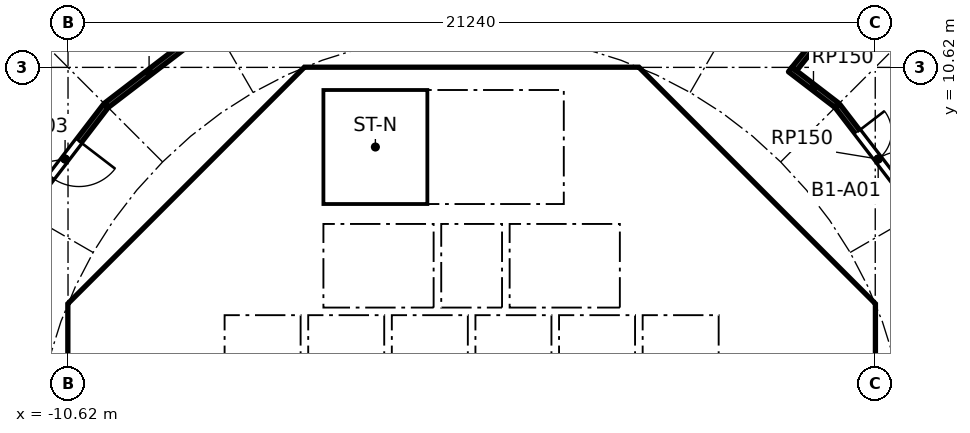
"""IFC4 building model, lengths in metres.
Left out: names, types, materials, properties, quantities, classifications, styles, units other than length and angle.
Written with IfcOpenShell. Run it as: python <this file> out.ifc"""

import sys

from ifc_helpers import new_model, si_unit, direction, frame, frame_2d, origin, place, context, subcontext, project, spatial, polyline, rectangle, outline, extrude, element, fill, save


model = new_model("IFC4")
c1 = context("Model", 3, precision=1e-05, world=origin(), true_north=direction((0.0, 1.0)))
c2 = subcontext(c1, "Body", "Model", "MODEL_VIEW")
j1 = project(units=[si_unit("LENGTHUNIT", "METRE"), si_unit("PLANEANGLEUNIT", "RADIAN")], contexts=[c1])
p1 = place(None, origin())
s1 = spatial("IfcSite", under=j1, at=p1, CompositionType="ELEMENT")
p2 = place(p1, origin())
s2 = spatial("IfcBuilding", under=s1, at=p2, CompositionType="ELEMENT")
p3 = place(p2, frame((0.0, 0.0, -5.0)))
s3 = spatial("IfcBuildingStorey", under=s2, at=p3, CompositionType="ELEMENT", Elevation=-5.0)
p4 = place(p3, frame((9.988, 4.613, 0.0), z_axis=(0.0, 0.0, 1.0), x_axis=(-0.707106781187, 0.707106781187, 0.0)))
e1 = element("IfcWall", 1, at=p4, inside=s3, PredefinedType="SHEAR", context=c2, shape_type="SweptSolid", body=[
    extrude(rectangle(XDim=7.602, YDim=0.6, at=frame_2d((3.801, 0.0))), origin(), (0.0, 0.0, 1.0), 4.6),
])
p5 = place(p4, frame((3.201, 0.0, 0.0)))
e2 = element("IfcOpeningElement", 2, at=p5, cuts=e1, PredefinedType="OPENING", context=c2, shape_type="SweptSolid", body=[
    extrude(rectangle(XDim=1.2, YDim=2.1, at=frame_2d((0.6, 1.05))), frame((0.0, 0.31, 0.0), z_axis=(0.0, -1.0, 0.0), x_axis=(1.0, 0.0, 0.0)), (0.0, 0.0, 1.0), 0.62),
])
p6 = place(p3, frame((-4.613, 9.988, 0.0), z_axis=(0.0, 0.0, 1.0), x_axis=(-0.707106781187, -0.707106781187, 0.0)))
e3 = element("IfcWall", 3, at=p6, inside=s3, PredefinedType="SHEAR", context=c2, shape_type="SweptSolid", body=[
    extrude(rectangle(XDim=7.602, YDim=0.6, at=frame_2d((3.801, 0.0))), origin(), (0.0, 0.0, 1.0), 4.6),
])
p7 = place(p6, frame((0.351, 0.0, 0.0)))
e4 = element("IfcOpeningElement", 4, at=p7, cuts=e3, PredefinedType="OPENING", context=c2, shape_type="SweptSolid", body=[
    extrude(rectangle(XDim=1.1, YDim=2.1, at=frame_2d((0.55, 1.05))), frame((0.0, 0.31, 0.0), z_axis=(0.0, -1.0, 0.0), x_axis=(1.0, 0.0, 0.0)), (0.0, 0.0, 1.0), 0.62),
])
p8 = place(p3, frame((-10.325, 3.801, 0.0), z_axis=(0.0, 0.0, 1.0), x_axis=(0.0, -1.0, 0.0)))
e5 = element("IfcWall", 5, at=p8, inside=s3, PredefinedType="SHEAR", context=c2, shape_type="SweptSolid", body=[
    extrude(rectangle(XDim=7.602, YDim=0.6, at=frame_2d((3.801, 0.0))), origin(), (0.0, 0.0, 1.0), 4.6),
])
p9 = place(p8, frame((0.651, 0.0, 0.0)))
e6 = element("IfcOpeningElement", 6, at=p9, cuts=e5, PredefinedType="OPENING", context=c2, shape_type="SweptSolid", body=[
    extrude(rectangle(XDim=1.5, YDim=2.1, at=frame_2d((0.75, 1.05))), frame((0.0, 0.31, 0.0), z_axis=(0.0, -1.0, 0.0), x_axis=(1.0, 0.0, 0.0)), (0.0, 0.0, 1.0), 0.62),
])
p10 = place(p8, frame((5.451, 0.0, 0.0)))
e7 = element("IfcOpeningElement", 7, at=p10, cuts=e5, PredefinedType="OPENING", context=c2, shape_type="SweptSolid", body=[
    extrude(rectangle(XDim=1.5, YDim=2.1, at=frame_2d((0.75, 1.05))), frame((0.0, 0.31, 0.0), z_axis=(0.0, -1.0, 0.0), x_axis=(1.0, 0.0, 0.0)), (0.0, 0.0, 1.0), 0.62),
])
p11 = place(p3, frame((-5.8, 4.3, 0.0), z_axis=(0.0, 0.0, 1.0), x_axis=(0.0, 1.0, 0.0)))
e8 = element("IfcWall", 8, at=p11, inside=s3, PredefinedType="PARTITIONING", context=c2, shape_type="SweptSolid", body=[
    extrude(rectangle(XDim=3.927, YDim=0.15, at=frame_2d((1.963, 0.0))), origin(), (0.0, 0.0, 1.0), 4.6),
])
p12 = place(p11, frame((1.551, 0.0, 0.0)))
e9 = element("IfcOpeningElement", 9, at=p12, cuts=e8, PredefinedType="OPENING", context=c2, shape_type="SweptSolid", body=[
    extrude(rectangle(XDim=0.9, YDim=2.1, at=frame_2d((0.45, 1.05))), frame((0.0, 0.085, 0.0), z_axis=(0.0, -1.0, 0.0), x_axis=(1.0, 0.0, 0.0)), (0.0, 0.0, 1.0), 0.17),
])
p13 = place(p3, frame((4.0, 4.3, 0.0), z_axis=(0.0, 0.0, 1.0), x_axis=(0.0, 1.0, 0.0)))
e10 = element("IfcWall", 10, at=p13, inside=s3, PredefinedType="SOLIDWALL", context=c2, shape_type="SweptSolid", body=[
    extrude(rectangle(XDim=2.2, YDim=0.2, at=frame_2d((1.1, 0.0))), origin(), (0.0, 0.0, 1.0), 4.6),
])
p14 = place(p13, frame((0.55, 0.0, 0.0)))
e11 = element("IfcOpeningElement", 11, at=p14, cuts=e10, PredefinedType="OPENING", context=c2, shape_type="SweptSolid", body=[
    extrude(rectangle(XDim=1.1, YDim=2.1, at=frame_2d((0.55, 1.05))), frame((0.0, 0.11, 0.0), z_axis=(0.0, -1.0, 0.0), x_axis=(1.0, 0.0, 0.0)), (0.0, 0.0, 1.0), 0.22),
])
p15 = place(p3, frame((-4.0, 4.3, 0.0), z_axis=(0.0, 0.0, 1.0), x_axis=(0.0, 1.0, 0.0)))
e12 = element("IfcWall", 12, at=p15, inside=s3, PredefinedType="SOLIDWALL", context=c2, shape_type="SweptSolid", body=[
    extrude(rectangle(XDim=2.2, YDim=0.2, at=frame_2d((1.1, 0.0))), origin(), (0.0, 0.0, 1.0), 4.6),
])
p16 = place(p15, frame((0.55, 0.0, 0.0)))
e13 = element("IfcOpeningElement", 13, at=p16, cuts=e12, PredefinedType="OPENING", context=c2, shape_type="SweptSolid", body=[
    extrude(rectangle(XDim=1.1, YDim=2.1, at=frame_2d((0.55, 1.05))), frame((0.0, 0.11, 0.0), z_axis=(0.0, -1.0, 0.0), x_axis=(1.0, 0.0, 0.0)), (0.0, 0.0, 1.0), 0.22),
])
p17 = place(p3, frame((6.7, 4.0, 0.0), z_axis=(0.0, 0.0, 1.0), x_axis=(1.0, 0.0, 0.0)))
e14 = element("IfcWall", 14, at=p17, inside=s3, PredefinedType="SOLIDWALL", context=c2, shape_type="SweptSolid", body=[
    extrude(rectangle(XDim=3.325, YDim=0.2, at=frame_2d((1.662, 0.0))), origin(), (0.0, 0.0, 1.0), 4.6),
])
p18 = place(p17, frame((1.25, 0.0, 0.0)))
e15 = element("IfcOpeningElement", 15, at=p18, cuts=e14, PredefinedType="OPENING", context=c2, shape_type="SweptSolid", body=[
    extrude(rectangle(XDim=1.1, YDim=2.1, at=frame_2d((0.55, 1.05))), frame((0.0, 0.11, 0.0), z_axis=(0.0, -1.0, 0.0), x_axis=(1.0, 0.0, 0.0)), (0.0, 0.0, 1.0), 0.22),
])
p19 = place(p3, frame((4.0, 7.025, 0.0), z_axis=(0.0, 0.0, 1.0), x_axis=(0.0, 1.0, 0.0)))
e16 = element("IfcWall", 16, at=p19, inside=s3, PredefinedType="SOLIDWALL", context=c2, shape_type="SweptSolid", body=[
    extrude(rectangle(XDim=3.0, YDim=0.2, at=frame_2d((1.5, 0.0))), origin(), (0.0, 0.0, 1.0), 4.6),
])
p20 = place(p19, frame((0.925, 0.0, 0.0)))
e17 = element("IfcOpeningElement", 17, at=p20, cuts=e16, PredefinedType="OPENING", context=c2, shape_type="SweptSolid", body=[
    extrude(rectangle(XDim=1.1, YDim=2.1, at=frame_2d((0.55, 1.05))), frame((0.0, 0.11, 0.0), z_axis=(0.0, -1.0, 0.0), x_axis=(1.0, 0.0, 0.0)), (0.0, 0.0, 1.0), 0.22),
])
p21 = place(p3, origin())
e18 = element("IfcWall", 18, at=p21, inside=s3, PredefinedType="SHEAR", context=c2, shape_type="SweptSolid", body=[
    extrude(outline(polyline([(-10.2, 4.825), (-9.776, 4.401), (-10.025, 4.152), (-10.025, 3.801), (-10.625, 3.801), (-10.625, 4.401), (-10.2, 4.825)])), origin(), (0.0, 0.0, 1.0), 4.6),
])
p22 = place(p3, origin())
e19 = element("IfcWall", 19, at=p22, inside=s3, PredefinedType="SHEAR", context=c2, shape_type="SweptSolid", body=[
    extrude(outline(polyline([(-4.152, 10.025), (-4.401, 9.776), (-4.825, 10.2), (-4.401, 10.625), (4.401, 10.625), (4.825, 10.2), (4.401, 9.776), (4.152, 10.025), (-4.152, 10.025)])), origin(), (0.0, 0.0, 1.0), 4.6),
])
p23 = place(p3, origin())
e20 = element("IfcWall", 20, at=p23, inside=s3, PredefinedType="SHEAR", context=c2, shape_type="SweptSolid", body=[
    extrude(outline(polyline([(9.776, -4.401), (10.025, -4.152), (10.025, -3.801), (10.025, 4.152), (9.776, 4.401), (10.2, 4.825), (10.625, 4.401), (10.625, -4.401), (10.2, -4.825), (9.776, -4.401)])), origin(), (0.0, 0.0, 1.0), 4.6),
])
for number, where, z_axis, x_axis in (
    (21, (-0.9, 4.3, 0.0), (0.0, 0.0, 1.0), (0.0, 1.0, 0.0)),
    (22, (0.9, 4.3, 0.0), (0.0, 0.0, 1.0), (0.0, 1.0, 0.0)),
):
    element("IfcWall", number, at=place(p3, frame(where, z_axis=z_axis, x_axis=x_axis)), inside=s3, PredefinedType="SOLIDWALL", context=c2, shape_type="SweptSolid", body=[
        extrude(rectangle(XDim=2.2, YDim=0.2, at=frame_2d((1.1, 0.0))), origin(), (0.0, 0.0, 1.0), 4.6),
    ])
p24 = place(p3, origin())
e23 = element("IfcWall", 23, at=p24, inside=s3, PredefinedType="SOLIDWALL", context=c2, shape_type="SweptSolid", body=[
    extrude(outline(polyline([(-6.5, 2.1), (-6.7, 2.1), (-6.7, 4.3), (6.7, 4.3), (6.7, 2.1), (6.5, 2.1), (6.5, 4.1), (4.5, 4.1), (4.5, 2.1), (4.3, 2.1), (4.3, 4.1), (2.3, 4.1), (2.3, 2.1), (2.1, 2.1), (2.1, 4.1), (0.1, 4.1), (0.1, 2.1), (-0.1, 2.1), (-0.1, 4.1), (-2.1, 4.1), (-2.1, 2.1), (-2.3, 2.1), (-2.3, 4.1), (-4.3, 4.1), (-4.3, 2.1), (-4.5, 2.1), (-4.5, 4.1), (-6.5, 4.1), (-6.5, 2.1)])), origin(), (0.0, 0.0, 1.0), 4.6),
])
p25 = place(p3, frame((-10.025, 4.0, 0.0), z_axis=(0.0, 0.0, 1.0), x_axis=(1.0, 0.0, 0.0)))
e24 = element("IfcWall", 24, at=p25, inside=s3, PredefinedType="PARTITIONING", context=c2, shape_type="SweptSolid", body=[
    extrude(rectangle(XDim=3.325, YDim=0.2, at=frame_2d((1.662, 0.0))), origin(), (0.0, 0.0, 1.0), 4.6),
])
p26 = place(p3, origin())
e25 = element("IfcWall", 25, at=p26, inside=s3, PredefinedType="SOLIDWALL", context=c2, shape_type="SweptSolid", body=[
    extrude(outline(polyline([(-3.9, 7.025), (-4.1, 7.025), (-4.1, 10.025), (-3.9, 10.025), (-3.9, 7.025)])), origin(), (0.0, 0.0, 1.0), 4.6),
])
p27 = place(p3, origin())
e26 = element("IfcWall", 26, at=p27, inside=s3, PredefinedType="SOLIDWALL", context=c2, shape_type="SweptSolid", body=[
    extrude(outline(polyline([(4.1, 6.5), (-4.1, 6.5), (-4.1, 7.025), (4.1, 7.025), (4.1, 6.5)])), origin(), (0.0, 0.0, 1.0), 4.6),
])
p28 = place(p3, origin())
e27 = element("IfcWall", 27, at=p28, inside=s3, PredefinedType="SOLIDWALL", context=c2, shape_type="SweptSolid", body=[
    extrude(outline(polyline([(7.025, -3.9), (6.7, -3.9), (6.7, 3.9), (7.025, 3.9), (7.025, -3.9)])), origin(), (0.0, 0.0, 1.0), 4.6),
])
p29 = place(p3, frame((-11.771, 6.809, 0.0), z_axis=(0.0, 0.0, 1.0), x_axis=(0.608736710054, 0.793372307201, 0.0)))
e28 = element("IfcWall", 28, at=p29, inside=s3, PredefinedType="PARTITIONING", context=c2, shape_type="SweptSolid", body=[
    extrude(rectangle(XDim=3.527, YDim=0.15, at=frame_2d((1.763, 0.0))), origin(), (0.0, 0.0, 1.0), 4.6),
])
p30 = place(p29, frame((1.163, 0.0, 0.0)))
e29 = element("IfcOpeningElement", 29, at=p30, cuts=e28, PredefinedType="OPENING", context=c2, shape_type="SweptSolid", body=[
    extrude(rectangle(XDim=1.2, YDim=2.1, at=frame_2d((0.6, 1.05))), frame((0.0, 0.085, 0.0), z_axis=(0.0, -1.0, 0.0), x_axis=(1.0, 0.0, 0.0)), (0.0, 0.0, 1.0), 0.17),
])
p31 = place(p3, frame((-9.607, 9.624, 0.0), z_axis=(0.0, 0.0, 1.0), x_axis=(0.793375345407, 0.608732750311, 0.0)))
e30 = element("IfcWall", 30, at=p31, inside=s3, PredefinedType="PARTITIONING", context=c2, shape_type="SweptSolid", body=[
    extrude(rectangle(XDim=2.824, YDim=0.15, at=frame_2d((1.412, 0.0))), origin(), (0.0, 0.0, 1.0), 4.6),
])
p32 = place(p3, frame((8.382, 10.564, 0.0), z_axis=(0.0, 0.0, 1.0), x_axis=(0.793405235736, -0.608693791578, 0.0)))
e31 = element("IfcWall", 31, at=p32, inside=s3, PredefinedType="PARTITIONING", context=c2, shape_type="SweptSolid", body=[
    extrude(rectangle(XDim=1.544, YDim=0.15, at=frame_2d((0.772, 0.0))), origin(), (0.0, 0.0, 1.0), 4.6),
])
p33 = place(p3, frame((9.624, 9.607, 0.0), z_axis=(0.0, 0.0, 1.0), x_axis=(0.608736710054, -0.793372307201, 0.0)))
e32 = element("IfcWall", 32, at=p33, inside=s3, PredefinedType="PARTITIONING", context=c2, shape_type="SweptSolid", body=[
    extrude(rectangle(XDim=3.527, YDim=0.15, at=frame_2d((1.763, 0.0))), origin(), (0.0, 0.0, 1.0), 4.6),
])
p34 = place(p33, frame((0.863, 0.0, 0.0)))
e33 = element("IfcOpeningElement", 33, at=p34, cuts=e32, PredefinedType="OPENING", context=c2, shape_type="SweptSolid", body=[
    extrude(rectangle(XDim=1.8, YDim=2.1, at=frame_2d((0.9, 1.05))), frame((0.0, 0.085, 0.0), z_axis=(0.0, -1.0, 0.0), x_axis=(1.0, 0.0, 0.0)), (0.0, 0.0, 1.0), 0.17),
])
p35 = place(p3, frame((12.245, 15.257, 0.0), z_axis=(0.0, 0.0, 1.0), x_axis=(-0.625939450801, -0.779871658628, 0.0)))
e34 = element("IfcWall", 34, at=p35, inside=s3, PredefinedType="PARTITIONING", context=c2, shape_type="SweptSolid", body=[
    extrude(rectangle(XDim=6.001, YDim=0.15, at=frame_2d((3.001, 0.0))), origin(), (0.0, 0.0, 1.0), 4.6),
])
p36 = place(p14, origin())
e35 = element("IfcDoor", 35, at=p36, inside=s3, OperationType="DOUBLE_DOOR_SLIDING", PredefinedType="DOOR", context=c2, shape_type="SweptSolid", body=[
    extrude(rectangle(XDim=1.1, YDim=2.1, at=frame_2d((0.55, 1.05))), frame((0.0, 0.025, 0.0), z_axis=(0.0, -1.0, 0.0), x_axis=(1.0, 0.0, 0.0)), (0.0, 0.0, 1.0), 0.05),
])
fill(e11, e35)
p37 = place(p16, origin())
e36 = element("IfcDoor", 36, at=p37, inside=s3, OperationType="DOUBLE_DOOR_SLIDING", PredefinedType="DOOR", context=c2, shape_type="SweptSolid", body=[
    extrude(rectangle(XDim=1.1, YDim=2.1, at=frame_2d((0.55, 1.05))), frame((0.0, 0.025, 0.0), z_axis=(0.0, -1.0, 0.0), x_axis=(1.0, 0.0, 0.0)), (0.0, 0.0, 1.0), 0.05),
])
fill(e13, e36)
p38 = place(p18, frame((1.1, 0.0, 0.0), x_axis=(-1.0, 0.0, 0.0)))
e37 = element("IfcDoor", 37, at=p38, inside=s3, OperationType="SINGLE_SWING_RIGHT", PredefinedType="DOOR", context=c2, shape_type="SweptSolid", body=[
    extrude(rectangle(XDim=1.1, YDim=2.1, at=frame_2d((0.55, 1.05))), frame((0.0, 0.025, 0.0), z_axis=(0.0, -1.0, 0.0), x_axis=(1.0, 0.0, 0.0)), (0.0, 0.0, 1.0), 0.05),
])
fill(e15, e37)
p39 = place(p20, origin())
e38 = element("IfcDoor", 38, at=p39, inside=s3, OperationType="SINGLE_SWING_LEFT", PredefinedType="DOOR", context=c2, shape_type="SweptSolid", body=[
    extrude(rectangle(XDim=1.1, YDim=2.1, at=frame_2d((0.55, 1.05))), frame((0.0, 0.025, 0.0), z_axis=(0.0, -1.0, 0.0), x_axis=(1.0, 0.0, 0.0)), (0.0, 0.0, 1.0), 0.05),
])
fill(e17, e38)
p40 = place(p12, origin())
e39 = element("IfcDoor", 39, at=p40, inside=s3, OperationType="SINGLE_SWING_RIGHT", PredefinedType="DOOR", context=c2, shape_type="SweptSolid", body=[
    extrude(rectangle(XDim=0.9, YDim=2.1, at=frame_2d((0.45, 1.05))), frame((0.0, 0.025, 0.0), z_axis=(0.0, -1.0, 0.0), x_axis=(1.0, 0.0, 0.0)), (0.0, 0.0, 1.0), 0.05),
])
fill(e9, e39)
p41 = place(p5, origin())
e40 = element("IfcDoor", 40, at=p41, inside=s3, OperationType="SINGLE_SWING_RIGHT", PredefinedType="DOOR", context=c2, shape_type="SweptSolid", body=[
    extrude(rectangle(XDim=1.2, YDim=2.1, at=frame_2d((0.6, 1.05))), frame((0.0, 0.025, 0.0), z_axis=(0.0, -1.0, 0.0), x_axis=(1.0, 0.0, 0.0)), (0.0, 0.0, 1.0), 0.05),
])
fill(e2, e40)
p42 = place(p9, origin())
e41 = element("IfcDoor", 41, at=p42, inside=s3, OperationType="DOUBLE_DOOR_SINGLE_SWING", PredefinedType="DOOR", context=c2, shape_type="SweptSolid", body=[
    extrude(rectangle(XDim=1.5, YDim=2.1, at=frame_2d((0.75, 1.05))), frame((0.0, 0.025, 0.0), z_axis=(0.0, -1.0, 0.0), x_axis=(1.0, 0.0, 0.0)), (0.0, 0.0, 1.0), 0.05),
])
fill(e6, e41)
p43 = place(p7, origin())
e42 = element("IfcDoor", 42, at=p43, inside=s3, OperationType="SINGLE_SWING_RIGHT", PredefinedType="DOOR", context=c2, shape_type="SweptSolid", body=[
    extrude(rectangle(XDim=1.1, YDim=2.1, at=frame_2d((0.55, 1.05))), frame((0.0, 0.025, 0.0), z_axis=(0.0, -1.0, 0.0), x_axis=(1.0, 0.0, 0.0)), (0.0, 0.0, 1.0), 0.05),
])
fill(e4, e42)
p44 = place(p34, origin())
e43 = element("IfcDoor", 43, at=p44, inside=s3, OperationType="DOUBLE_DOOR_SINGLE_SWING", PredefinedType="DOOR", context=c2, shape_type="SweptSolid", body=[
    extrude(rectangle(XDim=1.8, YDim=2.1, at=frame_2d((0.9, 1.05))), frame((0.0, 0.025, 0.0), z_axis=(0.0, -1.0, 0.0), x_axis=(1.0, 0.0, 0.0)), (0.0, 0.0, 1.0), 0.05),
])
fill(e33, e43)
p45 = place(p30, frame((1.2, 0.0, 0.0), x_axis=(-1.0, 0.0, 0.0)))
e44 = element("IfcDoor", 44, at=p45, inside=s3, OperationType="SINGLE_SWING_LEFT", PredefinedType="DOOR", context=c2, shape_type="SweptSolid", body=[
    extrude(rectangle(XDim=1.2, YDim=2.1, at=frame_2d((0.6, 1.05))), frame((0.0, 0.025, 0.0), z_axis=(0.0, -1.0, 0.0), x_axis=(1.0, 0.0, 0.0)), (0.0, 0.0, 1.0), 0.05),
])
fill(e29, e44)
save(model, sys.argv[1])
